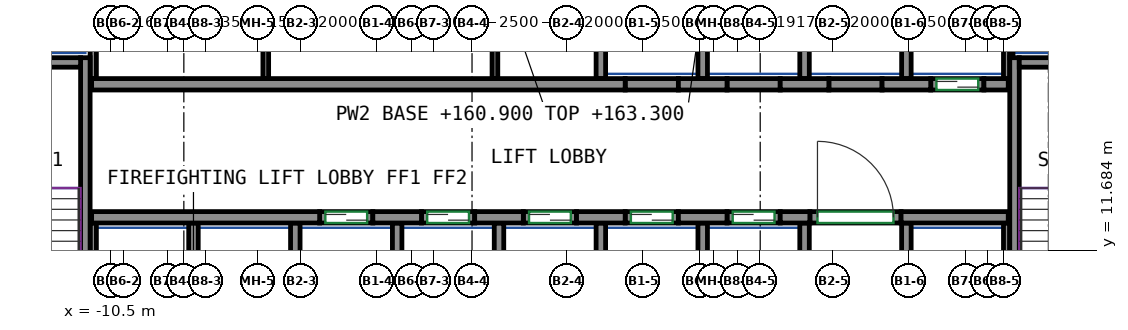
"""IFC4 building model, lengths in metres.
Left out: names, types, materials, properties, quantities, classifications, styles, units other than length and angle.
Written with IfcOpenShell. Run it as: python <this file> out.ifc"""

import sys

from ifc_helpers import new_model, si_unit, direction, frame, frame_2d, origin, place, context, subcontext, project, spatial, rectangle, extrude, source, transform, mapped, element, fill, save


model = new_model("IFC4")
c1 = context("Model", 3, precision=1e-05, world=origin(), true_north=direction((0.0, 1.0)))
c2 = subcontext(c1, "Body", "Model", "MODEL_VIEW")
j1 = project(units=[si_unit("LENGTHUNIT", "METRE"), si_unit("PLANEANGLEUNIT", "RADIAN")], contexts=[c1])
p1 = place(None, origin())
s1 = spatial("IfcSite", under=j1, at=p1, CompositionType="ELEMENT")
p2 = place(p1, origin())
s2 = spatial("IfcBuilding", under=s1, at=p2, CompositionType="ELEMENT")
p3 = place(p2, frame((0.0, 0.0, 160.9)))
s3 = spatial("IfcBuildingStorey", under=s2, at=p3, CompositionType="ELEMENT", Elevation=160.9)
m1 = source(origin(), c2, "Body", "SweptSolid", [
    extrude(rectangle(XDim=7.75, YDim=0.25, at=frame_2d((3.875, 0.0))), origin(), (0.0, 0.0, 1.0), 3.0),
])
p4 = place(p3, frame((-11.175, 9.0, 0.0), z_axis=(0.0, 0.0, 1.0), x_axis=(0.0, 1.0, 0.0)))
e1 = element("IfcWall", 1, at=p4, inside=s3, PredefinedType="SHEAR", context=c2, shape_type="MappedRepresentation", body=[
    mapped(m1, transform((0.0, 0.0, 0.0))),
])
m2 = source(origin(), c2, "Body", "SweptSolid", [
    extrude(rectangle(XDim=3.7, YDim=0.25, at=frame_2d((1.85, 0.0))), origin(), (0.0, 0.0, 1.0), 3.0),
])
p5 = place(p3, frame((-15.0, 16.625, 0.0), z_axis=(0.0, 0.0, 1.0), x_axis=(1.0, 0.0, 0.0)))
e2 = element("IfcWall", 2, at=p5, inside=s3, PredefinedType="SHEAR", context=c2, shape_type="MappedRepresentation", body=[
    mapped(m2, transform((0.0, 0.0, 0.0))),
])
p6 = place(p3, frame((13.275, 9.0, 0.0), z_axis=(0.0, 0.0, 1.0), x_axis=(0.0, 1.0, 0.0)))
e3 = element("IfcWall", 3, at=p6, inside=s3, PredefinedType="SHEAR", context=c2, shape_type="MappedRepresentation", body=[
    mapped(m1, transform((0.0, 0.0, 0.0))),
])
m3 = source(origin(), c2, "Body", "SweptSolid", [
    extrude(rectangle(XDim=3.7, YDim=0.25, at=frame_2d((1.85, 0.0))), origin(), (0.0, 0.0, 1.0), 3.0),
])
p7 = place(p3, frame((13.4, 16.625, 0.0), z_axis=(0.0, 0.0, 1.0), x_axis=(1.0, 0.0, 0.0)))
e4 = element("IfcWall", 4, at=p7, inside=s3, PredefinedType="SHEAR", context=c2, shape_type="MappedRepresentation", body=[
    mapped(m3, transform((0.0, 0.0, 0.0))),
])
m4 = source(origin(), c2, "Body", "SweptSolid", [
    extrude(rectangle(XDim=6.0, YDim=0.3, at=frame_2d((3.0, 0.0))), origin(), (0.0, 0.0, 1.0), 3.0),
])
p8 = place(p3, frame((-11.01, 12.55, 0.0), z_axis=(0.0, 0.0, 1.0), x_axis=(1.0, 0.0, 0.0)))
e5 = element("IfcWall", 5, at=p8, inside=s3, PredefinedType="SHEAR", context=c2, shape_type="MappedRepresentation", body=[
    mapped(m4, transform((0.0, 0.0, 0.0))),
])
m5 = source(origin(), c2, "Body", "SweptSolid", [
    extrude(rectangle(XDim=1.28, YDim=0.3, at=frame_2d((0.64, 0.0))), origin(), (0.0, 0.0, 1.0), 3.0),
])
for number, where, z_axis, x_axis in (
    (6, (-3.61, 12.55, 0.0), (0.0, 0.0, 1.0), (1.0, 0.0, 0.0)),
    (7, (-0.93, 12.55, 0.0), (0.0, 0.0, 1.0), (1.0, 0.0, 0.0)),
    (8, (1.75, 12.55, 0.0), (0.0, 0.0, 1.0), (1.0, 0.0, 0.0)),
    (9, (4.43, 12.55, 0.0), (0.0, 0.0, 1.0), (1.0, 0.0, 0.0)),
):
    element("IfcWall", number, at=place(p3, frame(where, z_axis=z_axis, x_axis=x_axis)), inside=s3, PredefinedType="SHEAR", context=c2, shape_type="MappedRepresentation", body=[
        mapped(m5, transform((0.0, 0.0, 0.0))),
    ])
m6 = source(origin(), c2, "Body", "SweptSolid", [
    extrude(rectangle(XDim=0.78, YDim=0.3, at=frame_2d((0.39, 0.0))), origin(), (0.0, 0.0, 1.0), 3.0),
])
p9 = place(p3, frame((7.11, 12.55, 0.0), z_axis=(0.0, 0.0, 1.0), x_axis=(1.0, 0.0, 0.0)))
e10 = element("IfcWall", 10, at=p9, inside=s3, PredefinedType="SHEAR", context=c2, shape_type="MappedRepresentation", body=[
    mapped(m6, transform((0.0, 0.0, 0.0))),
])
m7 = source(origin(), c2, "Body", "SweptSolid", [
    extrude(rectangle(XDim=2.82, YDim=0.3, at=frame_2d((1.41, 0.0))), origin(), (0.0, 0.0, 1.0), 3.0),
])
p10 = place(p3, frame((10.29, 12.55, 0.0), z_axis=(0.0, 0.0, 1.0), x_axis=(1.0, 0.0, 0.0)))
e11 = element("IfcWall", 11, at=p10, inside=s3, PredefinedType="SHEAR", context=c2, shape_type="MappedRepresentation", body=[
    mapped(m7, transform((0.0, 0.0, 0.0))),
])
m8 = source(origin(), c2, "Body", "SweptSolid", [
    extrude(rectangle(XDim=14.04, YDim=0.3, at=frame_2d((7.02, 0.0))), origin(), (0.0, 0.0, 1.0), 3.0),
])
p11 = place(p3, frame((-11.01, 16.05, 0.0), z_axis=(0.0, 0.0, 1.0), x_axis=(1.0, 0.0, 0.0)))
e12 = element("IfcWall", 12, at=p11, inside=s3, PredefinedType="SHEAR", context=c2, shape_type="MappedRepresentation", body=[
    mapped(m8, transform((0.0, 0.0, 0.0))),
])
p12 = place(p3, frame((4.43, 16.05, 0.0), z_axis=(0.0, 0.0, 1.0), x_axis=(1.0, 0.0, 0.0)))
e13 = element("IfcWall", 13, at=p12, inside=s3, PredefinedType="SHEAR", context=c2, shape_type="MappedRepresentation", body=[
    mapped(m5, transform((0.0, 0.0, 0.0))),
])
m9 = source(origin(), c2, "Body", "SweptSolid", [
    extrude(rectangle(XDim=1.28, YDim=0.3, at=frame_2d((0.64, 0.0))), origin(), (0.0, 0.0, 1.0), 3.0),
])
p13 = place(p3, frame((7.11, 16.05, 0.0), z_axis=(0.0, 0.0, 1.0), x_axis=(1.0, 0.0, 0.0)))
e14 = element("IfcWall", 14, at=p13, inside=s3, PredefinedType="SHEAR", context=c2, shape_type="MappedRepresentation", body=[
    mapped(m9, transform((0.0, 0.0, 0.0))),
])
p14 = place(p3, frame((9.79, 16.05, 0.0), z_axis=(0.0, 0.0, 1.0), x_axis=(1.0, 0.0, 0.0)))
e15 = element("IfcWall", 15, at=p14, inside=s3, PredefinedType="SHEAR", context=c2, shape_type="MappedRepresentation", body=[
    mapped(m5, transform((0.0, 0.0, 0.0))),
])
m10 = source(origin(), c2, "Body", "SweptSolid", [
    extrude(rectangle(XDim=0.64, YDim=0.3, at=frame_2d((0.32, 0.0))), origin(), (0.0, 0.0, 1.0), 3.0),
])
p15 = place(p3, frame((12.47, 16.05, 0.0), z_axis=(0.0, 0.0, 1.0), x_axis=(1.0, 0.0, 0.0)))
e16 = element("IfcWall", 16, at=p15, inside=s3, PredefinedType="SHEAR", context=c2, shape_type="MappedRepresentation", body=[
    mapped(m10, transform((0.0, 0.0, 0.0))),
])
m11 = source(origin(), c2, "Body", "SweptSolid", [
    extrude(rectangle(XDim=1.4, YDim=0.3, at=frame_2d((0.7, 0.0))), origin(), (0.0, 0.0, 1.0), 3.0),
])
p16 = place(p3, frame((-5.01, 12.55, 0.0), z_axis=(0.0, 0.0, 1.0), x_axis=(1.0, 0.0, 0.0)))
e17 = element("IfcWall", 17, at=p16, inside=s3, PredefinedType="PARTITIONING", context=c2, shape_type="MappedRepresentation", body=[
    mapped(m11, transform((0.0, 0.0, 0.0))),
])
p17 = place(p16, frame((0.15, 0.0, 0.0)))
e18 = element("IfcOpeningElement", 18, at=p17, cuts=e17, PredefinedType="OPENING", context=c2, shape_type="SweptSolid", body=[
    extrude(rectangle(XDim=1.1, YDim=2.1, at=frame_2d((0.55, 1.05))), frame((0.0, 0.16, 0.0), z_axis=(0.0, -1.0, 0.0), x_axis=(1.0, 0.0, 0.0)), (0.0, 0.0, 1.0), 0.32),
])
m12 = source(origin(), c2, "Body", "SweptSolid", [
    extrude(rectangle(XDim=1.4, YDim=0.3, at=frame_2d((0.7, 0.0))), origin(), (0.0, 0.0, 1.0), 3.0),
])
p18 = place(p3, frame((-2.33, 12.55, 0.0), z_axis=(0.0, 0.0, 1.0), x_axis=(1.0, 0.0, 0.0)))
e19 = element("IfcWall", 19, at=p18, inside=s3, PredefinedType="PARTITIONING", context=c2, shape_type="MappedRepresentation", body=[
    mapped(m12, transform((0.0, 0.0, 0.0))),
])
p19 = place(p18, frame((0.15, 0.0, 0.0)))
e20 = element("IfcOpeningElement", 20, at=p19, cuts=e19, PredefinedType="OPENING", context=c2, shape_type="SweptSolid", body=[
    extrude(rectangle(XDim=1.1, YDim=2.1, at=frame_2d((0.55, 1.05))), frame((0.0, 0.16, 0.0), z_axis=(0.0, -1.0, 0.0), x_axis=(1.0, 0.0, 0.0)), (0.0, 0.0, 1.0), 0.32),
])
p20 = place(p3, frame((0.35, 12.55, 0.0), z_axis=(0.0, 0.0, 1.0), x_axis=(1.0, 0.0, 0.0)))
e21 = element("IfcWall", 21, at=p20, inside=s3, PredefinedType="PARTITIONING", context=c2, shape_type="MappedRepresentation", body=[
    mapped(m11, transform((0.0, 0.0, 0.0))),
])
p21 = place(p20, frame((0.15, 0.0, 0.0)))
e22 = element("IfcOpeningElement", 22, at=p21, cuts=e21, PredefinedType="OPENING", context=c2, shape_type="SweptSolid", body=[
    extrude(rectangle(XDim=1.1, YDim=2.1, at=frame_2d((0.55, 1.05))), frame((0.0, 0.16, 0.0), z_axis=(0.0, -1.0, 0.0), x_axis=(1.0, 0.0, 0.0)), (0.0, 0.0, 1.0), 0.32),
])
p22 = place(p3, frame((3.03, 12.55, 0.0), z_axis=(0.0, 0.0, 1.0), x_axis=(1.0, 0.0, 0.0)))
e23 = element("IfcWall", 23, at=p22, inside=s3, PredefinedType="PARTITIONING", context=c2, shape_type="MappedRepresentation", body=[
    mapped(m11, transform((0.0, 0.0, 0.0))),
])
p23 = place(p22, frame((0.15, 0.0, 0.0)))
e24 = element("IfcOpeningElement", 24, at=p23, cuts=e23, PredefinedType="OPENING", context=c2, shape_type="SweptSolid", body=[
    extrude(rectangle(XDim=1.1, YDim=2.1, at=frame_2d((0.55, 1.05))), frame((0.0, 0.16, 0.0), z_axis=(0.0, -1.0, 0.0), x_axis=(1.0, 0.0, 0.0)), (0.0, 0.0, 1.0), 0.32),
])
p24 = place(p3, frame((5.71, 12.55, 0.0), z_axis=(0.0, 0.0, 1.0), x_axis=(1.0, 0.0, 0.0)))
e25 = element("IfcWall", 25, at=p24, inside=s3, PredefinedType="PARTITIONING", context=c2, shape_type="MappedRepresentation", body=[
    mapped(m12, transform((0.0, 0.0, 0.0))),
])
p25 = place(p24, frame((0.15, 0.0, 0.0)))
e26 = element("IfcOpeningElement", 26, at=p25, cuts=e25, PredefinedType="OPENING", context=c2, shape_type="SweptSolid", body=[
    extrude(rectangle(XDim=1.1, YDim=2.1, at=frame_2d((0.55, 1.05))), frame((0.0, 0.16, 0.0), z_axis=(0.0, -1.0, 0.0), x_axis=(1.0, 0.0, 0.0)), (0.0, 0.0, 1.0), 0.32),
])
p26 = place(p3, frame((11.07, 16.05, 0.0), z_axis=(0.0, 0.0, 1.0), x_axis=(1.0, 0.0, 0.0)))
e27 = element("IfcWall", 27, at=p26, inside=s3, PredefinedType="PARTITIONING", context=c2, shape_type="MappedRepresentation", body=[
    mapped(m11, transform((0.0, 0.0, 0.0))),
])
p27 = place(p26, frame((0.15, 0.0, 0.0)))
e28 = element("IfcOpeningElement", 28, at=p27, cuts=e27, PredefinedType="OPENING", context=c2, shape_type="SweptSolid", body=[
    extrude(rectangle(XDim=1.1, YDim=2.1, at=frame_2d((0.55, 1.05))), frame((0.0, 0.16, 0.0), z_axis=(0.0, -1.0, 0.0), x_axis=(1.0, 0.0, 0.0)), (0.0, 0.0, 1.0), 0.32),
])
m13 = source(origin(), c2, "Body", "SweptSolid", [
    extrude(rectangle(XDim=2.4, YDim=0.3, at=frame_2d((1.2, 0.0))), origin(), (0.0, 0.0, 1.0), 3.0),
])
p28 = place(p3, frame((7.89, 12.55, 0.0), z_axis=(0.0, 0.0, 1.0), x_axis=(1.0, 0.0, 0.0)))
e29 = element("IfcWall", 29, at=p28, inside=s3, PredefinedType="PARTITIONING", context=c2, shape_type="MappedRepresentation", body=[
    mapped(m13, transform((0.0, 0.0, 0.0))),
])
p29 = place(p28, frame((0.2, 0.0, 0.0)))
e30 = element("IfcOpeningElement", 30, at=p29, cuts=e29, PredefinedType="OPENING", context=c2, shape_type="SweptSolid", body=[
    extrude(rectangle(XDim=2.0, YDim=2.1, at=frame_2d((1.0, 1.05))), frame((0.0, 0.16, 0.0), z_axis=(0.0, -1.0, 0.0), x_axis=(1.0, 0.0, 0.0)), (0.0, 0.0, 1.0), 0.32),
])
p30 = place(p3, frame((3.03, 16.05, 0.0), z_axis=(0.0, 0.0, 1.0), x_axis=(1.0, 0.0, 0.0)))
e31 = element("IfcWall", 31, at=p30, inside=s3, PredefinedType="PARTITIONING", context=c2, shape_type="MappedRepresentation", body=[
    mapped(m11, transform((0.0, 0.0, 0.0))),
])
for number, where, z_axis, x_axis in (
    (32, (5.71, 16.05, 0.0), (0.0, 0.0, 1.0), (1.0, 0.0, 0.0)),
    (33, (8.39, 16.05, 0.0), (0.0, 0.0, 1.0), (1.0, 0.0, 0.0)),
):
    element("IfcWall", number, at=place(p3, frame(where, z_axis=z_axis, x_axis=x_axis)), inside=s3, PredefinedType="PARTITIONING", context=c2, shape_type="MappedRepresentation", body=[
        mapped(m12, transform((0.0, 0.0, 0.0))),
    ])
m14 = source(origin(), c2, "Body", "SweptSolid", [
    extrude(rectangle(XDim=3.275, YDim=0.165, at=frame_2d((1.638, 0.0))), origin(), (0.0, 0.0, 1.0), 3.0),
])
p31 = place(p3, frame((13.067, 16.2, 0.0), z_axis=(0.0, 0.0, 1.0), x_axis=(0.0, 1.0, 0.0)))
e34 = element("IfcWall", 34, at=p31, inside=s3, PredefinedType="PARTITIONING", context=c2, shape_type="MappedRepresentation", body=[
    mapped(m14, transform((0.0, 0.0, 0.0))),
])
m15 = source(origin(), c2, "Body", "SweptSolid", [
    extrude(rectangle(XDim=4.8, YDim=0.165, at=frame_2d((2.4, 0.0))), origin(), (0.0, 0.0, 1.0), 3.0),
])
p32 = place(p3, frame((-10.968, 16.2, 0.0), z_axis=(0.0, 0.0, 1.0), x_axis=(0.0, 1.0, 0.0)))
e35 = element("IfcWall", 35, at=p32, inside=s3, PredefinedType="PARTITIONING", context=c2, shape_type="MappedRepresentation", body=[
    mapped(m15, transform((0.0, 0.0, 0.0))),
])
m16 = source(origin(), c2, "Body", "SweptSolid", [
    extrude(rectangle(XDim=3.275, YDim=0.25, at=frame_2d((1.638, 0.0))), origin(), (0.0, 0.0, 1.0), 3.0),
])
p33 = place(p3, frame((10.43, 16.2, 0.0), z_axis=(0.0, 0.0, 1.0), x_axis=(0.0, 1.0, 0.0)))
e36 = element("IfcWall", 36, at=p33, inside=s3, PredefinedType="PARTITIONING", context=c2, shape_type="MappedRepresentation", body=[
    mapped(m16, transform((0.0, 0.0, 0.0))),
])
m17 = source(origin(), c2, "Body", "SweptSolid", [
    extrude(rectangle(XDim=2.725, YDim=0.085, at=frame_2d((1.363, 0.0))), origin(), (0.0, 0.0, 1.0), 3.0),
])
p34 = place(p3, frame((13.192, 16.75, 0.0), z_axis=(0.0, 0.0, 1.0), x_axis=(0.0, 1.0, 0.0)))
e37 = element("IfcWall", 37, at=p34, inside=s3, PredefinedType="PARTITIONING", context=c2, shape_type="MappedRepresentation", body=[
    mapped(m17, transform((0.0, 0.0, 0.0))),
])
for number, where, z_axis, x_axis in (
    (38, (2.39, 16.2, 0.0), (0.0, 0.0, 1.0), (0.0, 1.0, 0.0)),
    (39, (5.07, 16.2, 0.0), (0.0, 0.0, 1.0), (0.0, 1.0, 0.0)),
    (40, (7.75, 16.2, 0.0), (0.0, 0.0, 1.0), (0.0, 1.0, 0.0)),
):
    element("IfcWall", number, at=place(p3, frame(where, z_axis=z_axis, x_axis=x_axis)), inside=s3, PredefinedType="PARTITIONING", context=c2, shape_type="MappedRepresentation", body=[
        mapped(m16, transform((0.0, 0.0, 0.0))),
    ])
m18 = source(origin(), c2, "Body", "SweptSolid", [
    extrude(rectangle(XDim=3.4, YDim=0.25, at=frame_2d((1.7, 0.0))), origin(), (0.0, 0.0, 1.0), 3.0),
])
p35 = place(p3, frame((10.43, 9.0, 0.0), z_axis=(0.0, 0.0, 1.0), x_axis=(0.0, 1.0, 0.0)))
e41 = element("IfcWall", 41, at=p35, inside=s3, PredefinedType="PARTITIONING", context=c2, shape_type="MappedRepresentation", body=[
    mapped(m18, transform((0.0, 0.0, 0.0))),
])
m19 = source(origin(), c2, "Body", "SweptSolid", [
    extrude(rectangle(XDim=3.4, YDim=0.165, at=frame_2d((1.7, 0.0))), origin(), (0.0, 0.0, 1.0), 3.0),
])
p36 = place(p3, frame((13.067, 9.0, 0.0), z_axis=(0.0, 0.0, 1.0), x_axis=(0.0, 1.0, 0.0)))
e42 = element("IfcWall", 42, at=p36, inside=s3, PredefinedType="PARTITIONING", context=c2, shape_type="MappedRepresentation", body=[
    mapped(m19, transform((0.0, 0.0, 0.0))),
])
for number, where, z_axis, x_axis in (
    (43, (2.39, 9.0, 0.0), (0.0, 0.0, 1.0), (0.0, 1.0, 0.0)),
    (44, (5.07, 9.0, 0.0), (0.0, 0.0, 1.0), (0.0, 1.0, 0.0)),
    (45, (7.75, 9.0, 0.0), (0.0, 0.0, 1.0), (0.0, 1.0, 0.0)),
    (46, (-0.29, 9.0, 0.0), (0.0, 0.0, 1.0), (0.0, 1.0, 0.0)),
):
    element("IfcWall", number, at=place(p3, frame(where, z_axis=z_axis, x_axis=x_axis)), inside=s3, PredefinedType="PARTITIONING", context=c2, shape_type="MappedRepresentation", body=[
        mapped(m18, transform((0.0, 0.0, 0.0))),
    ])
p37 = place(p3, frame((-10.968, 9.0, 0.0), z_axis=(0.0, 0.0, 1.0), x_axis=(0.0, 1.0, 0.0)))
e47 = element("IfcWall", 47, at=p37, inside=s3, PredefinedType="PARTITIONING", context=c2, shape_type="MappedRepresentation", body=[
    mapped(m19, transform((0.0, 0.0, 0.0))),
])
for number, where, z_axis, x_axis in (
    (48, (-2.97, 9.0, 0.0), (0.0, 0.0, 1.0), (0.0, 1.0, 0.0)),
    (49, (-5.65, 9.0, 0.0), (0.0, 0.0, 1.0), (0.0, 1.0, 0.0)),
    (50, (-8.33, 9.0, 0.0), (0.0, 0.0, 1.0), (0.0, 1.0, 0.0)),
):
    element("IfcWall", number, at=place(p3, frame(where, z_axis=z_axis, x_axis=x_axis)), inside=s3, PredefinedType="PARTITIONING", context=c2, shape_type="MappedRepresentation", body=[
        mapped(m18, transform((0.0, 0.0, 0.0))),
    ])
m20 = source(origin(), c2, "Body", "SweptSolid", [
    extrude(rectangle(XDim=4.8, YDim=0.15, at=frame_2d((2.4, 0.0))), origin(), (0.0, 0.0, 1.0), 3.0),
])
for number, where, z_axis, x_axis in (
    (51, (-6.427, 16.2, 0.0), (0.0, 0.0, 1.0), (0.0, 1.0, 0.0)),
    (52, (-0.397, 16.2, 0.0), (0.0, 0.0, 1.0), (0.0, 1.0, 0.0)),
):
    element("IfcWall", number, at=place(p3, frame(where, z_axis=z_axis, x_axis=x_axis)), inside=s3, PredefinedType="PARTITIONING", context=c2, shape_type="MappedRepresentation", body=[
        mapped(m20, transform((0.0, 0.0, 0.0))),
    ])
p38 = place(p29, origin())
e53 = element("IfcDoor", 53, at=p38, inside=s3, OperationType="DOUBLE_DOOR_SINGLE_SWING", PredefinedType="DOOR", context=c2, shape_type="SweptSolid", body=[
    extrude(rectangle(XDim=2.0, YDim=2.1, at=frame_2d((1.0, 1.05))), frame((0.0, 0.025, 0.0), z_axis=(0.0, -1.0, 0.0), x_axis=(1.0, 0.0, 0.0)), (0.0, 0.0, 1.0), 0.05),
])
fill(e30, e53)
p39 = place(p17, origin())
e54 = element("IfcDoor", 54, at=p39, inside=s3, OperationType="DOUBLE_DOOR_SLIDING", PredefinedType="DOOR", context=c2, shape_type="SweptSolid", body=[
    extrude(rectangle(XDim=1.1, YDim=2.1, at=frame_2d((0.55, 1.05))), frame((0.0, 0.025, 0.0), z_axis=(0.0, -1.0, 0.0), x_axis=(1.0, 0.0, 0.0)), (0.0, 0.0, 1.0), 0.05),
])
fill(e18, e54)
p40 = place(p19, origin())
e55 = element("IfcDoor", 55, at=p40, inside=s3, OperationType="DOUBLE_DOOR_SLIDING", PredefinedType="DOOR", context=c2, shape_type="SweptSolid", body=[
    extrude(rectangle(XDim=1.1, YDim=2.1, at=frame_2d((0.55, 1.05))), frame((0.0, 0.025, 0.0), z_axis=(0.0, -1.0, 0.0), x_axis=(1.0, 0.0, 0.0)), (0.0, 0.0, 1.0), 0.05),
])
fill(e20, e55)
p41 = place(p21, origin())
e56 = element("IfcDoor", 56, at=p41, inside=s3, OperationType="DOUBLE_DOOR_SLIDING", PredefinedType="DOOR", context=c2, shape_type="SweptSolid", body=[
    extrude(rectangle(XDim=1.1, YDim=2.1, at=frame_2d((0.55, 1.05))), frame((0.0, 0.025, 0.0), z_axis=(0.0, -1.0, 0.0), x_axis=(1.0, 0.0, 0.0)), (0.0, 0.0, 1.0), 0.05),
])
fill(e22, e56)
p42 = place(p23, origin())
e57 = element("IfcDoor", 57, at=p42, inside=s3, OperationType="DOUBLE_DOOR_SLIDING", PredefinedType="DOOR", context=c2, shape_type="SweptSolid", body=[
    extrude(rectangle(XDim=1.1, YDim=2.1, at=frame_2d((0.55, 1.05))), frame((0.0, 0.025, 0.0), z_axis=(0.0, -1.0, 0.0), x_axis=(1.0, 0.0, 0.0)), (0.0, 0.0, 1.0), 0.05),
])
fill(e24, e57)
p43 = place(p25, origin())
e58 = element("IfcDoor", 58, at=p43, inside=s3, OperationType="DOUBLE_DOOR_SLIDING", PredefinedType="DOOR", context=c2, shape_type="SweptSolid", body=[
    extrude(rectangle(XDim=1.1, YDim=2.1, at=frame_2d((0.55, 1.05))), frame((0.0, 0.025, 0.0), z_axis=(0.0, -1.0, 0.0), x_axis=(1.0, 0.0, 0.0)), (0.0, 0.0, 1.0), 0.05),
])
fill(e26, e58)
p44 = place(p27, origin())
e59 = element("IfcDoor", 59, at=p44, inside=s3, OperationType="DOUBLE_DOOR_SLIDING", PredefinedType="DOOR", context=c2, shape_type="SweptSolid", body=[
    extrude(rectangle(XDim=1.1, YDim=2.1, at=frame_2d((0.55, 1.05))), frame((0.0, 0.025, 0.0), z_axis=(0.0, -1.0, 0.0), x_axis=(1.0, 0.0, 0.0)), (0.0, 0.0, 1.0), 0.05),
])
fill(e28, e59)
save(model, sys.argv[1])
